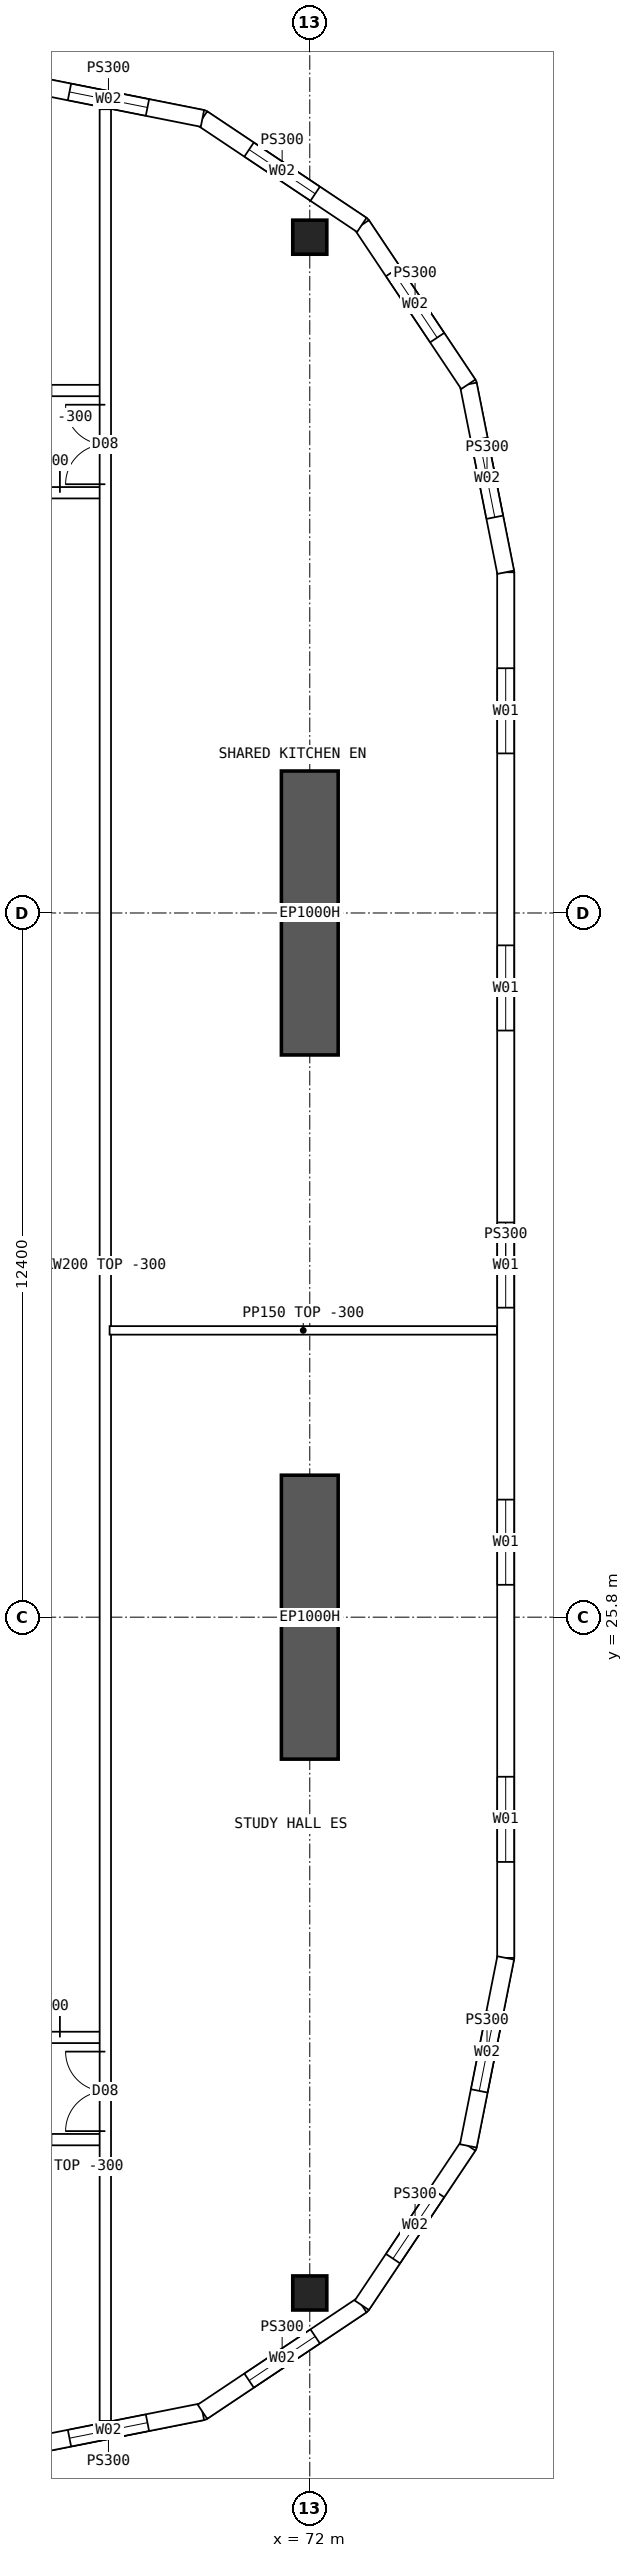
"""IFC4 building model, lengths in metres.
Left out: names, types, materials, properties, quantities, classifications, styles, units other than length and angle.
Written with IfcOpenShell. Run it as: python <this file> out.ifc"""

import sys

from ifc_helpers import new_model, si_unit, direction, frame, frame_2d, origin, origin_2d, place, context, subcontext, project, spatial, polyline, rectangle, hollow_rectangle, outline, extrude, element, fill, save


model = new_model("IFC4")
c1 = context("Model", 3, precision=1e-05, world=origin(), true_north=direction((0.0, 1.0)))
c2 = subcontext(c1, "Body", "Model", "MODEL_VIEW")
j1 = project(units=[si_unit("LENGTHUNIT", "METRE"), si_unit("PLANEANGLEUNIT", "RADIAN")], contexts=[c1])
p1 = place(None, origin())
s1 = spatial("IfcSite", under=j1, at=p1, CompositionType="ELEMENT")
p2 = place(p1, origin())
s2 = spatial("IfcBuilding", under=s1, at=p2, CompositionType="ELEMENT")
p3 = place(p2, frame((0.0, 0.0, 254.05)))
s3 = spatial("IfcBuildingStorey", under=s2, at=p3, CompositionType="ELEMENT", Elevation=254.05)
for number, where, z_axis, x_axis in (
    (1, (72.0, 13.9, 0.0), (0.0, 0.0, 1.0), (1.0, 0.0, 0.0)),
    (2, (72.0, 50.1, 0.0), (0.0, 0.0, 1.0), (1.0, 0.0, 0.0)),
):
    element("IfcColumn", number, at=place(p3, frame(where, z_axis=z_axis, x_axis=x_axis)), inside=s3, PredefinedType="COLUMN", context=c2, shape_type="SweptSolid", body=[
        extrude(hollow_rectangle(XDim=0.6, YDim=0.6, WallThickness=0.06, at=origin_2d()), origin(), (0.0, 0.0, 1.0), 3.75),
    ])
for number, where, z_axis, x_axis in (
    (3, (72.0, 23.3, 0.0), (0.0, 0.0, 1.0), (0.0, 1.0, 0.0)),
    (4, (72.0, 35.7, 0.0), (0.0, 0.0, 1.0), (0.0, 1.0, 0.0)),
):
    element("IfcWall", number, at=place(p3, frame(where, z_axis=z_axis, x_axis=x_axis)), inside=s3, PredefinedType="SHEAR", context=c2, shape_type="SweptSolid", body=[
        extrude(rectangle(XDim=5.0, YDim=1.0, at=frame_2d((2.5, 0.0))), origin(), (0.0, 0.0, 1.0), 3.75),
    ])
p4 = place(p3, frame((75.45, 19.8, 0.0), z_axis=(0.0, 0.0, 1.0), x_axis=(0.0, 1.0, 0.0)))
e5 = element("IfcWall", 5, at=p4, inside=s3, PredefinedType="SOLIDWALL", context=c2, shape_type="SweptSolid", body=[
    extrude(outline(polyline([(-0.015, -0.15), (24.415, -0.15), (24.385, 0.15), (0.015, 0.15), (-0.015, -0.15)])), origin(), (0.0, 0.0, 1.0), 3.45),
])
p5 = place(p4, frame((1.69, 0.0, 0.9)))
e6 = element("IfcOpeningElement", 6, at=p5, cuts=e5, PredefinedType="OPENING", context=c2, shape_type="SweptSolid", body=[
    extrude(rectangle(XDim=1.5, YDim=2.0, at=frame_2d((0.75, 1.0))), frame((0.0, 0.16, 0.0), z_axis=(0.0, -1.0, 0.0), x_axis=(1.0, 0.0, 0.0)), (0.0, 0.0, 1.0), 0.32),
])
p6 = place(p4, frame((6.57, 0.0, 0.9)))
e7 = element("IfcOpeningElement", 7, at=p6, cuts=e5, PredefinedType="OPENING", context=c2, shape_type="SweptSolid", body=[
    extrude(rectangle(XDim=1.5, YDim=2.0, at=frame_2d((0.75, 1.0))), frame((0.0, 0.16, 0.0), z_axis=(0.0, -1.0, 0.0), x_axis=(1.0, 0.0, 0.0)), (0.0, 0.0, 1.0), 0.32),
])
p7 = place(p4, frame((11.45, 0.0, 0.9)))
e8 = element("IfcOpeningElement", 8, at=p7, cuts=e5, PredefinedType="OPENING", context=c2, shape_type="SweptSolid", body=[
    extrude(rectangle(XDim=1.5, YDim=2.0, at=frame_2d((0.75, 1.0))), frame((0.0, 0.16, 0.0), z_axis=(0.0, -1.0, 0.0), x_axis=(1.0, 0.0, 0.0)), (0.0, 0.0, 1.0), 0.32),
])
p8 = place(p4, frame((16.33, 0.0, 0.9)))
e9 = element("IfcOpeningElement", 9, at=p8, cuts=e5, PredefinedType="OPENING", context=c2, shape_type="SweptSolid", body=[
    extrude(rectangle(XDim=1.5, YDim=2.0, at=frame_2d((0.75, 1.0))), frame((0.0, 0.16, 0.0), z_axis=(0.0, -1.0, 0.0), x_axis=(1.0, 0.0, 0.0)), (0.0, 0.0, 1.0), 0.32),
])
p9 = place(p4, frame((21.21, 0.0, 0.9)))
e10 = element("IfcOpeningElement", 10, at=p9, cuts=e5, PredefinedType="OPENING", context=c2, shape_type="SweptSolid", body=[
    extrude(rectangle(XDim=1.5, YDim=2.0, at=frame_2d((0.75, 1.0))), frame((0.0, 0.16, 0.0), z_axis=(0.0, -1.0, 0.0), x_axis=(1.0, 0.0, 0.0)), (0.0, 0.0, 1.0), 0.32),
])
p10 = place(p3, frame((66.8, 11.15, 0.0), z_axis=(0.0, 0.0, 1.0), x_axis=(0.98078325777, 0.195100490205, 0.0)))
e11 = element("IfcWall", 11, at=p10, inside=s3, PredefinedType="SOLIDWALL", context=c2, shape_type="SweptSolid", body=[
    extrude(outline(polyline([(-0.03, -0.15), (3.405, -0.15), (3.345, 0.15), (0.03, 0.15), (-0.03, -0.15)])), origin(), (0.0, 0.0, 1.0), 3.45),
])
p11 = place(p10, frame((0.988, 0.0, 0.9)))
e12 = element("IfcOpeningElement", 12, at=p11, cuts=e11, PredefinedType="OPENING", context=c2, shape_type="SweptSolid", body=[
    extrude(rectangle(XDim=1.4, YDim=1.8, at=frame_2d((0.7, 0.9))), frame((0.0, 0.16, 0.0), z_axis=(0.0, -1.0, 0.0), x_axis=(1.0, 0.0, 0.0)), (0.0, 0.0, 1.0), 0.32),
])
p12 = place(p3, frame((70.11, 11.808, 0.0), z_axis=(0.0, 0.0, 1.0), x_axis=(0.831460037396, 0.555584562613, 0.0)))
e13 = element("IfcWall", 13, at=p12, inside=s3, PredefinedType="SOLIDWALL", context=c2, shape_type="SweptSolid", body=[
    extrude(outline(polyline([(-0.03, -0.15), (3.405, -0.15), (3.345, 0.15), (0.03, 0.15), (-0.03, -0.15)])), origin(), (0.0, 0.0, 1.0), 3.45),
])
p13 = place(p12, frame((0.988, 0.0, 0.9)))
e14 = element("IfcOpeningElement", 14, at=p13, cuts=e13, PredefinedType="OPENING", context=c2, shape_type="SweptSolid", body=[
    extrude(rectangle(XDim=1.4, YDim=1.8, at=frame_2d((0.7, 0.9))), frame((0.0, 0.16, 0.0), z_axis=(0.0, -1.0, 0.0), x_axis=(1.0, 0.0, 0.0)), (0.0, 0.0, 1.0), 0.32),
])
p14 = place(p3, frame((72.917, 13.684, 0.0), z_axis=(0.0, 0.0, 1.0), x_axis=(0.555567969291, 0.831471124873, 0.0)))
e15 = element("IfcWall", 15, at=p14, inside=s3, PredefinedType="SOLIDWALL", context=c2, shape_type="SweptSolid", body=[
    extrude(outline(polyline([(-0.03, -0.15), (3.405, -0.15), (3.345, 0.15), (0.03, 0.15), (-0.03, -0.15)])), origin(), (0.0, 0.0, 1.0), 3.45),
])
p15 = place(p14, frame((0.988, 0.0, 0.9)))
e16 = element("IfcOpeningElement", 16, at=p15, cuts=e15, PredefinedType="OPENING", context=c2, shape_type="SweptSolid", body=[
    extrude(rectangle(XDim=1.4, YDim=1.8, at=frame_2d((0.7, 0.9))), frame((0.0, 0.16, 0.0), z_axis=(0.0, -1.0, 0.0), x_axis=(1.0, 0.0, 0.0)), (0.0, 0.0, 1.0), 0.32),
])
p16 = place(p3, frame((74.792, 16.49, 0.0), z_axis=(0.0, 0.0, 1.0), x_axis=(0.19508664885, 0.980786011034, 0.0)))
e17 = element("IfcWall", 17, at=p16, inside=s3, PredefinedType="SOLIDWALL", context=c2, shape_type="SweptSolid", body=[
    extrude(outline(polyline([(-0.03, -0.15), (3.39, -0.15), (3.36, 0.15), (0.03, 0.15), (-0.03, -0.15)])), origin(), (0.0, 0.0, 1.0), 3.45),
])
p17 = place(p16, frame((0.988, 0.0, 0.9)))
e18 = element("IfcOpeningElement", 18, at=p17, cuts=e17, PredefinedType="OPENING", context=c2, shape_type="SweptSolid", body=[
    extrude(rectangle(XDim=1.4, YDim=1.8, at=frame_2d((0.7, 0.9))), frame((0.0, 0.16, 0.0), z_axis=(0.0, -1.0, 0.0), x_axis=(1.0, 0.0, 0.0)), (0.0, 0.0, 1.0), 0.32),
])
p18 = place(p3, frame((75.45, 44.2, 0.0), z_axis=(0.0, 0.0, 1.0), x_axis=(-0.19508664885, 0.980786011034, 0.0)))
e19 = element("IfcWall", 19, at=p18, inside=s3, PredefinedType="SOLIDWALL", context=c2, shape_type="SweptSolid", body=[
    extrude(outline(polyline([(-0.015, -0.15), (3.405, -0.15), (3.345, 0.15), (0.015, 0.15), (-0.015, -0.15)])), origin(), (0.0, 0.0, 1.0), 3.45),
])
p19 = place(p18, frame((0.988, 0.0, 0.9)))
e20 = element("IfcOpeningElement", 20, at=p19, cuts=e19, PredefinedType="OPENING", context=c2, shape_type="SweptSolid", body=[
    extrude(rectangle(XDim=1.4, YDim=1.8, at=frame_2d((0.7, 0.9))), frame((0.0, 0.16, 0.0), z_axis=(0.0, -1.0, 0.0), x_axis=(1.0, 0.0, 0.0)), (0.0, 0.0, 1.0), 0.32),
])
p20 = place(p3, frame((74.792, 47.51, 0.0), z_axis=(0.0, 0.0, 1.0), x_axis=(-0.555567969291, 0.831471124873, 0.0)))
e21 = element("IfcWall", 21, at=p20, inside=s3, PredefinedType="SOLIDWALL", context=c2, shape_type="SweptSolid", body=[
    extrude(outline(polyline([(-0.03, -0.15), (3.405, -0.15), (3.345, 0.15), (0.03, 0.15), (-0.03, -0.15)])), origin(), (0.0, 0.0, 1.0), 3.45),
])
p21 = place(p20, frame((0.988, 0.0, 0.9)))
e22 = element("IfcOpeningElement", 22, at=p21, cuts=e21, PredefinedType="OPENING", context=c2, shape_type="SweptSolid", body=[
    extrude(rectangle(XDim=1.4, YDim=1.8, at=frame_2d((0.7, 0.9))), frame((0.0, 0.16, 0.0), z_axis=(0.0, -1.0, 0.0), x_axis=(1.0, 0.0, 0.0)), (0.0, 0.0, 1.0), 0.32),
])
p22 = place(p3, frame((72.917, 50.316, 0.0), z_axis=(0.0, 0.0, 1.0), x_axis=(-0.831460037396, 0.555584562613, 0.0)))
e23 = element("IfcWall", 23, at=p22, inside=s3, PredefinedType="SOLIDWALL", context=c2, shape_type="SweptSolid", body=[
    extrude(outline(polyline([(-0.03, -0.15), (3.405, -0.15), (3.345, 0.15), (0.03, 0.15), (-0.03, -0.15)])), origin(), (0.0, 0.0, 1.0), 3.45),
])
p23 = place(p22, frame((0.988, 0.0, 0.9)))
e24 = element("IfcOpeningElement", 24, at=p23, cuts=e23, PredefinedType="OPENING", context=c2, shape_type="SweptSolid", body=[
    extrude(rectangle(XDim=1.4, YDim=1.8, at=frame_2d((0.7, 0.9))), frame((0.0, 0.16, 0.0), z_axis=(0.0, -1.0, 0.0), x_axis=(1.0, 0.0, 0.0)), (0.0, 0.0, 1.0), 0.32),
])
p24 = place(p3, frame((70.11, 52.192, 0.0), z_axis=(0.0, 0.0, 1.0), x_axis=(-0.98078325777, 0.195100490205, 0.0)))
e25 = element("IfcWall", 25, at=p24, inside=s3, PredefinedType="SOLIDWALL", context=c2, shape_type="SweptSolid", body=[
    extrude(outline(polyline([(-0.03, -0.15), (3.405, -0.15), (3.345, 0.15), (0.03, 0.15), (-0.03, -0.15)])), origin(), (0.0, 0.0, 1.0), 3.45),
])
p25 = place(p24, frame((0.988, 0.0, 0.9)))
e26 = element("IfcOpeningElement", 26, at=p25, cuts=e25, PredefinedType="OPENING", context=c2, shape_type="SweptSolid", body=[
    extrude(rectangle(XDim=1.4, YDim=1.8, at=frame_2d((0.7, 0.9))), frame((0.0, 0.16, 0.0), z_axis=(0.0, -1.0, 0.0), x_axis=(1.0, 0.0, 0.0)), (0.0, 0.0, 1.0), 0.32),
])
p26 = place(p3, frame((66.35, 16.6, 0.0), z_axis=(0.0, 0.0, 1.0), x_axis=(1.0, 0.0, 0.0)))
e27 = element("IfcWall", 27, at=p26, inside=s3, PredefinedType="SOLIDWALL", context=c2, shape_type="SweptSolid", body=[
    extrude(rectangle(XDim=2.05, YDim=0.2, at=frame_2d((1.025, 0.0))), origin(), (0.0, 0.0, 1.0), 3.45),
])
p27 = place(p26, frame((0.2, 0.0, 0.0)))
e28 = element("IfcOpeningElement", 28, at=p27, cuts=e27, PredefinedType="OPENING", context=c2, shape_type="SweptSolid", body=[
    extrude(rectangle(XDim=0.9, YDim=2.1, at=frame_2d((0.45, 1.05))), frame((0.0, 0.11, 0.0), z_axis=(0.0, -1.0, 0.0), x_axis=(1.0, 0.0, 0.0)), (0.0, 0.0, 1.0), 0.22),
])
p28 = place(p3, frame((66.35, 18.4, 0.0), z_axis=(0.0, 0.0, 1.0), x_axis=(1.0, 0.0, 0.0)))
e29 = element("IfcWall", 29, at=p28, inside=s3, PredefinedType="SOLIDWALL", context=c2, shape_type="SweptSolid", body=[
    extrude(rectangle(XDim=2.05, YDim=0.2, at=frame_2d((1.025, 0.0))), origin(), (0.0, 0.0, 1.0), 3.45),
])
p29 = place(p28, frame((0.05, 0.0, 0.0)))
e30 = element("IfcOpeningElement", 30, at=p29, cuts=e29, PredefinedType="OPENING", context=c2, shape_type="SweptSolid", body=[
    extrude(rectangle(XDim=1.2, YDim=2.1, at=frame_2d((0.6, 1.05))), frame((0.0, 0.11, 0.0), z_axis=(0.0, -1.0, 0.0), x_axis=(1.0, 0.0, 0.0)), (0.0, 0.0, 1.0), 0.22),
])
p30 = place(p3, frame((66.35, 47.4, 0.0), z_axis=(0.0, 0.0, 1.0), x_axis=(1.0, 0.0, 0.0)))
e31 = element("IfcWall", 31, at=p30, inside=s3, PredefinedType="SOLIDWALL", context=c2, shape_type="SweptSolid", body=[
    extrude(rectangle(XDim=2.05, YDim=0.2, at=frame_2d((1.025, 0.0))), origin(), (0.0, 0.0, 1.0), 3.45),
])
p31 = place(p30, frame((0.2, 0.0, 0.0)))
e32 = element("IfcOpeningElement", 32, at=p31, cuts=e31, PredefinedType="OPENING", context=c2, shape_type="SweptSolid", body=[
    extrude(rectangle(XDim=0.9, YDim=2.1, at=frame_2d((0.45, 1.05))), frame((0.0, 0.11, 0.0), z_axis=(0.0, -1.0, 0.0), x_axis=(1.0, 0.0, 0.0)), (0.0, 0.0, 1.0), 0.22),
])
p32 = place(p3, frame((66.35, 45.6, 0.0), z_axis=(0.0, 0.0, 1.0), x_axis=(1.0, 0.0, 0.0)))
e33 = element("IfcWall", 33, at=p32, inside=s3, PredefinedType="SOLIDWALL", context=c2, shape_type="SweptSolid", body=[
    extrude(rectangle(XDim=2.05, YDim=0.2, at=frame_2d((1.025, 0.0))), origin(), (0.0, 0.0, 1.0), 3.45),
])
p33 = place(p32, frame((0.05, 0.0, 0.0)))
e34 = element("IfcOpeningElement", 34, at=p33, cuts=e33, PredefinedType="OPENING", context=c2, shape_type="SweptSolid", body=[
    extrude(rectangle(XDim=1.2, YDim=2.1, at=frame_2d((0.6, 1.05))), frame((0.0, 0.11, 0.0), z_axis=(0.0, -1.0, 0.0), x_axis=(1.0, 0.0, 0.0)), (0.0, 0.0, 1.0), 0.22),
])
p34 = place(p3, frame((68.475, 30.85, 0.0), z_axis=(0.0, 0.0, 1.0), x_axis=(1.0, 0.0, 0.0)))
e35 = element("IfcWall", 35, at=p34, inside=s3, PredefinedType="PARTITIONING", context=c2, shape_type="SweptSolid", body=[
    extrude(outline(polyline([(0.0, 0.0), (6.82, 0.0), (6.82, 3.45), (3.827, 3.45), (3.825, 3.0), (3.227, 3.0), (3.225, 3.45), (0.0, 3.45), (0.0, 0.0)])), frame((0.0, 0.075, 0.0), z_axis=(0.0, -1.0, 0.0), x_axis=(1.0, 0.0, 0.0)), (0.0, 0.0, 1.0), 0.15),
])
p35 = place(p3, frame((68.4, 11.646, 0.0), z_axis=(0.0, 0.0, 1.0), x_axis=(0.0, 1.0, 0.0)))
e36 = element("IfcWall", 36, at=p35, inside=s3, PredefinedType="SOLIDWALL", context=c2, shape_type="SweptSolid", body=[
    extrude(rectangle(XDim=40.708, YDim=0.2, at=frame_2d((20.354, 0.0))), origin(), (0.0, 0.0, 1.0), 3.45),
])
p36 = place(p35, frame((5.104, 0.0, 0.0)))
e37 = element("IfcOpeningElement", 37, at=p36, cuts=e36, PredefinedType="OPENING", context=c2, shape_type="SweptSolid", body=[
    extrude(rectangle(XDim=1.4, YDim=2.1, at=frame_2d((0.7, 1.05))), frame((0.0, 0.11, 0.0), z_axis=(0.0, -1.0, 0.0), x_axis=(1.0, 0.0, 0.0)), (0.0, 0.0, 1.0), 0.22),
])
p37 = place(p35, frame((34.104, 0.0, 0.0)))
e38 = element("IfcOpeningElement", 38, at=p37, cuts=e36, PredefinedType="OPENING", context=c2, shape_type="SweptSolid", body=[
    extrude(rectangle(XDim=1.4, YDim=2.1, at=frame_2d((0.7, 1.05))), frame((0.0, 0.11, 0.0), z_axis=(0.0, -1.0, 0.0), x_axis=(1.0, 0.0, 0.0)), (0.0, 0.0, 1.0), 0.22),
])
p38 = place(p5, origin())
e39 = element("IfcWindow", 39, at=p38, inside=s3, PartitioningType="SINGLE_PANEL", PredefinedType="WINDOW", context=c2, shape_type="SweptSolid", body=[
    extrude(rectangle(XDim=1.5, YDim=2.0, at=frame_2d((0.75, 1.0))), frame((0.0, 0.03, 0.0), z_axis=(0.0, -1.0, 0.0), x_axis=(1.0, 0.0, 0.0)), (0.0, 0.0, 1.0), 0.06),
])
fill(e6, e39)
p39 = place(p6, origin())
e40 = element("IfcWindow", 40, at=p39, inside=s3, PartitioningType="SINGLE_PANEL", PredefinedType="WINDOW", context=c2, shape_type="SweptSolid", body=[
    extrude(rectangle(XDim=1.5, YDim=2.0, at=frame_2d((0.75, 1.0))), frame((0.0, 0.03, 0.0), z_axis=(0.0, -1.0, 0.0), x_axis=(1.0, 0.0, 0.0)), (0.0, 0.0, 1.0), 0.06),
])
fill(e7, e40)
p40 = place(p7, origin())
e41 = element("IfcWindow", 41, at=p40, inside=s3, PartitioningType="SINGLE_PANEL", PredefinedType="WINDOW", context=c2, shape_type="SweptSolid", body=[
    extrude(rectangle(XDim=1.5, YDim=2.0, at=frame_2d((0.75, 1.0))), frame((0.0, 0.03, 0.0), z_axis=(0.0, -1.0, 0.0), x_axis=(1.0, 0.0, 0.0)), (0.0, 0.0, 1.0), 0.06),
])
fill(e8, e41)
p41 = place(p8, origin())
e42 = element("IfcWindow", 42, at=p41, inside=s3, PartitioningType="SINGLE_PANEL", PredefinedType="WINDOW", context=c2, shape_type="SweptSolid", body=[
    extrude(rectangle(XDim=1.5, YDim=2.0, at=frame_2d((0.75, 1.0))), frame((0.0, 0.03, 0.0), z_axis=(0.0, -1.0, 0.0), x_axis=(1.0, 0.0, 0.0)), (0.0, 0.0, 1.0), 0.06),
])
fill(e9, e42)
p42 = place(p9, origin())
e43 = element("IfcWindow", 43, at=p42, inside=s3, PartitioningType="SINGLE_PANEL", PredefinedType="WINDOW", context=c2, shape_type="SweptSolid", body=[
    extrude(rectangle(XDim=1.5, YDim=2.0, at=frame_2d((0.75, 1.0))), frame((0.0, 0.03, 0.0), z_axis=(0.0, -1.0, 0.0), x_axis=(1.0, 0.0, 0.0)), (0.0, 0.0, 1.0), 0.06),
])
fill(e10, e43)
p43 = place(p11, origin())
e44 = element("IfcWindow", 44, at=p43, inside=s3, PartitioningType="SINGLE_PANEL", PredefinedType="WINDOW", context=c2, shape_type="SweptSolid", body=[
    extrude(rectangle(XDim=1.4, YDim=1.8, at=frame_2d((0.7, 0.9))), frame((0.0, 0.03, 0.0), z_axis=(0.0, -1.0, 0.0), x_axis=(1.0, 0.0, 0.0)), (0.0, 0.0, 1.0), 0.06),
])
fill(e12, e44)
p44 = place(p13, origin())
e45 = element("IfcWindow", 45, at=p44, inside=s3, PartitioningType="SINGLE_PANEL", PredefinedType="WINDOW", context=c2, shape_type="SweptSolid", body=[
    extrude(rectangle(XDim=1.4, YDim=1.8, at=frame_2d((0.7, 0.9))), frame((0.0, 0.03, 0.0), z_axis=(0.0, -1.0, 0.0), x_axis=(1.0, 0.0, 0.0)), (0.0, 0.0, 1.0), 0.06),
])
fill(e14, e45)
p45 = place(p15, origin())
e46 = element("IfcWindow", 46, at=p45, inside=s3, PartitioningType="SINGLE_PANEL", PredefinedType="WINDOW", context=c2, shape_type="SweptSolid", body=[
    extrude(rectangle(XDim=1.4, YDim=1.8, at=frame_2d((0.7, 0.9))), frame((0.0, 0.03, 0.0), z_axis=(0.0, -1.0, 0.0), x_axis=(1.0, 0.0, 0.0)), (0.0, 0.0, 1.0), 0.06),
])
fill(e16, e46)
p46 = place(p17, origin())
e47 = element("IfcWindow", 47, at=p46, inside=s3, PartitioningType="SINGLE_PANEL", PredefinedType="WINDOW", context=c2, shape_type="SweptSolid", body=[
    extrude(rectangle(XDim=1.4, YDim=1.8, at=frame_2d((0.7, 0.9))), frame((0.0, 0.03, 0.0), z_axis=(0.0, -1.0, 0.0), x_axis=(1.0, 0.0, 0.0)), (0.0, 0.0, 1.0), 0.06),
])
fill(e18, e47)
p47 = place(p19, origin())
e48 = element("IfcWindow", 48, at=p47, inside=s3, PartitioningType="SINGLE_PANEL", PredefinedType="WINDOW", context=c2, shape_type="SweptSolid", body=[
    extrude(rectangle(XDim=1.4, YDim=1.8, at=frame_2d((0.7, 0.9))), frame((0.0, 0.03, 0.0), z_axis=(0.0, -1.0, 0.0), x_axis=(1.0, 0.0, 0.0)), (0.0, 0.0, 1.0), 0.06),
])
fill(e20, e48)
p48 = place(p21, origin())
e49 = element("IfcWindow", 49, at=p48, inside=s3, PartitioningType="SINGLE_PANEL", PredefinedType="WINDOW", context=c2, shape_type="SweptSolid", body=[
    extrude(rectangle(XDim=1.4, YDim=1.8, at=frame_2d((0.7, 0.9))), frame((0.0, 0.03, 0.0), z_axis=(0.0, -1.0, 0.0), x_axis=(1.0, 0.0, 0.0)), (0.0, 0.0, 1.0), 0.06),
])
fill(e22, e49)
p49 = place(p23, origin())
e50 = element("IfcWindow", 50, at=p49, inside=s3, PartitioningType="SINGLE_PANEL", PredefinedType="WINDOW", context=c2, shape_type="SweptSolid", body=[
    extrude(rectangle(XDim=1.4, YDim=1.8, at=frame_2d((0.7, 0.9))), frame((0.0, 0.03, 0.0), z_axis=(0.0, -1.0, 0.0), x_axis=(1.0, 0.0, 0.0)), (0.0, 0.0, 1.0), 0.06),
])
fill(e24, e50)
p50 = place(p25, origin())
e51 = element("IfcWindow", 51, at=p50, inside=s3, PartitioningType="SINGLE_PANEL", PredefinedType="WINDOW", context=c2, shape_type="SweptSolid", body=[
    extrude(rectangle(XDim=1.4, YDim=1.8, at=frame_2d((0.7, 0.9))), frame((0.0, 0.03, 0.0), z_axis=(0.0, -1.0, 0.0), x_axis=(1.0, 0.0, 0.0)), (0.0, 0.0, 1.0), 0.06),
])
fill(e26, e51)
p51 = place(p29, origin())
e52 = element("IfcDoor", 52, at=p51, inside=s3, OperationType="DOUBLE_DOOR_SINGLE_SWING", PredefinedType="DOOR", context=c2, shape_type="SweptSolid", body=[
    extrude(rectangle(XDim=1.2, YDim=2.1, at=frame_2d((0.6, 1.05))), frame((0.0, 0.025, 0.0), z_axis=(0.0, -1.0, 0.0), x_axis=(1.0, 0.0, 0.0)), (0.0, 0.0, 1.0), 0.05),
])
fill(e30, e52)
p52 = place(p33, origin())
e53 = element("IfcDoor", 53, at=p52, inside=s3, OperationType="DOUBLE_DOOR_SINGLE_SWING", PredefinedType="DOOR", context=c2, shape_type="SweptSolid", body=[
    extrude(rectangle(XDim=1.2, YDim=2.1, at=frame_2d((0.6, 1.05))), frame((0.0, 0.025, 0.0), z_axis=(0.0, -1.0, 0.0), x_axis=(1.0, 0.0, 0.0)), (0.0, 0.0, 1.0), 0.05),
])
fill(e34, e53)
p53 = place(p36, origin())
e54 = element("IfcDoor", 54, at=p53, inside=s3, OperationType="DOUBLE_DOOR_SINGLE_SWING", PredefinedType="DOOR", context=c2, shape_type="SweptSolid", body=[
    extrude(rectangle(XDim=1.4, YDim=2.1, at=frame_2d((0.7, 1.05))), frame((0.0, 0.025, 0.0), z_axis=(0.0, -1.0, 0.0), x_axis=(1.0, 0.0, 0.0)), (0.0, 0.0, 1.0), 0.05),
])
fill(e37, e54)
p54 = place(p37, origin())
e55 = element("IfcDoor", 55, at=p54, inside=s3, OperationType="DOUBLE_DOOR_SINGLE_SWING", PredefinedType="DOOR", context=c2, shape_type="SweptSolid", body=[
    extrude(rectangle(XDim=1.4, YDim=2.1, at=frame_2d((0.7, 1.05))), frame((0.0, 0.025, 0.0), z_axis=(0.0, -1.0, 0.0), x_axis=(1.0, 0.0, 0.0)), (0.0, 0.0, 1.0), 0.05),
])
fill(e38, e55)
save(model, sys.argv[1])
